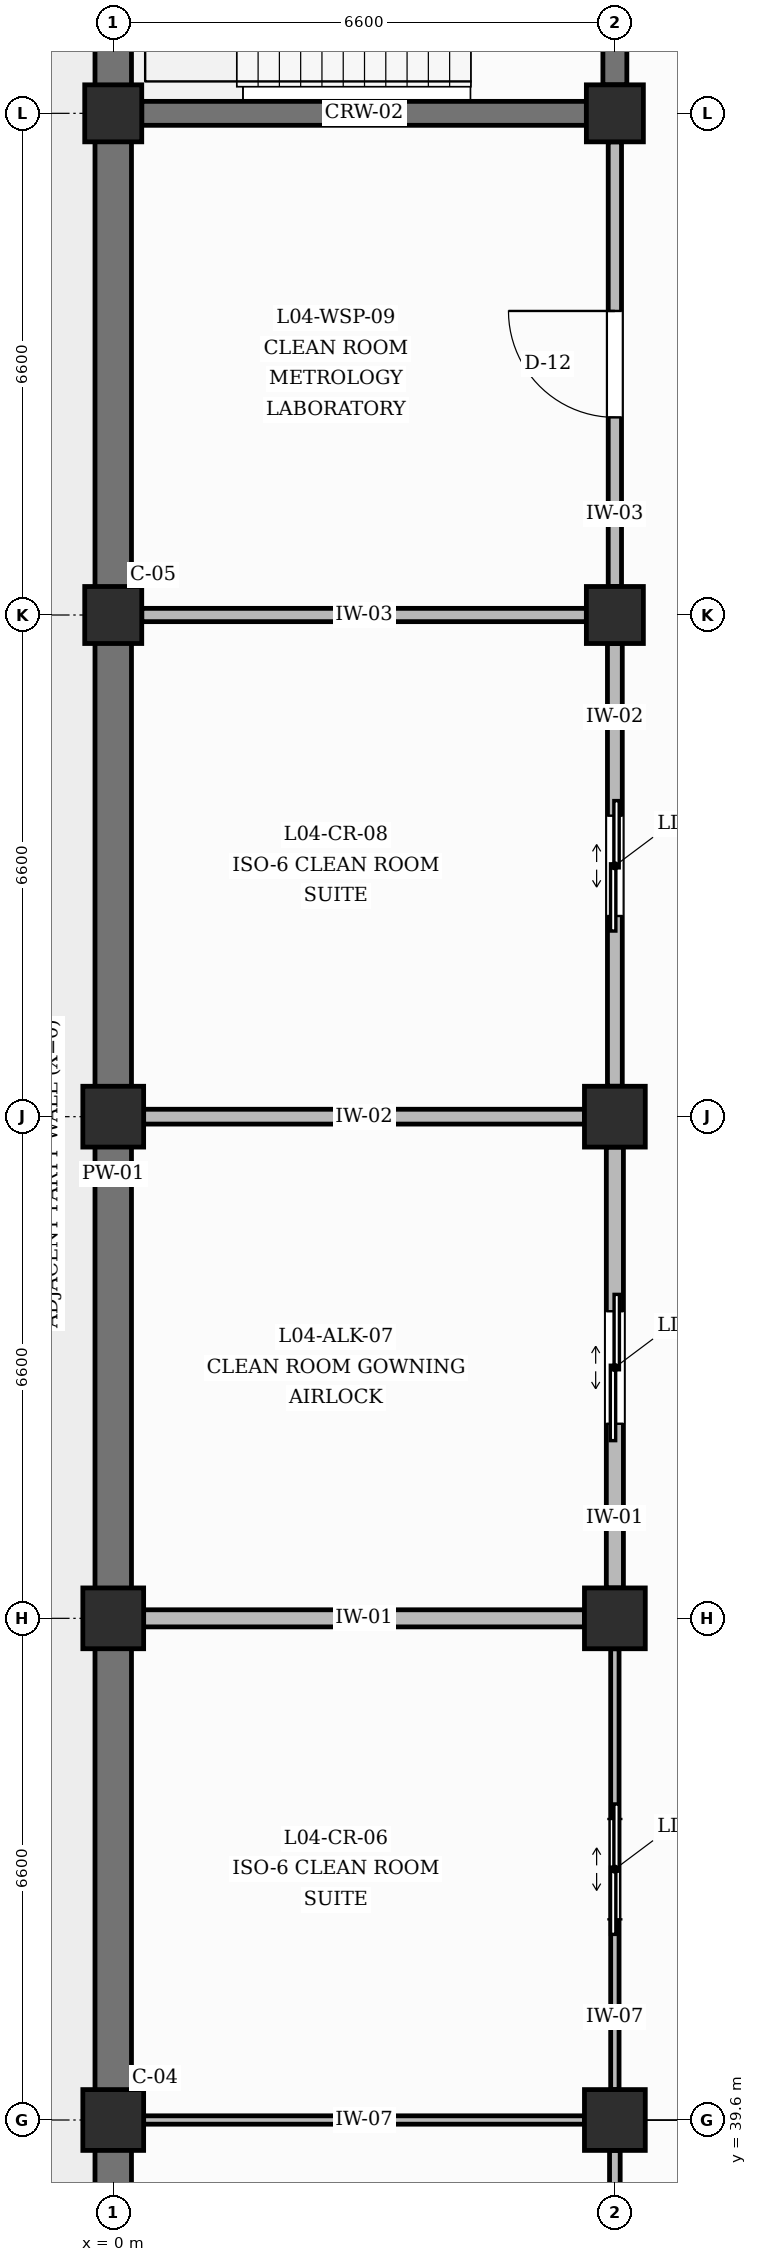
"""IFC4 building model, lengths in metres.
Left out: names, types, materials, properties, quantities, classifications, styles, units other than length and angle.
Written with IfcOpenShell. Run it as: python <this file> out.ifc"""

import sys

from ifc_helpers import new_model, si_unit, direction, frame, frame_2d, origin, origin_2d, place, context, subcontext, project, spatial, rectangle, extrude, element, fill, save


model = new_model("IFC4")
c1 = context("Model", 3, precision=1e-05, world=origin(), true_north=direction((0.0, 1.0)))
c2 = subcontext(c1, "Body", "Model", "MODEL_VIEW")
j1 = project(units=[si_unit("LENGTHUNIT", "METRE"), si_unit("PLANEANGLEUNIT", "RADIAN")], contexts=[c1])
p1 = place(None, origin())
s1 = spatial("IfcSite", under=j1, at=p1, CompositionType="ELEMENT")
p2 = place(p1, origin())
s2 = spatial("IfcBuilding", under=s1, at=p2, CompositionType="ELEMENT")
p3 = place(p2, frame((0.0, 0.0, 18.6)))
s3 = spatial("IfcBuildingStorey", under=s2, at=p3, CompositionType="ELEMENT", Elevation=18.6)
for number, where, z_axis, x_axis in (
    (1, (0.0, 39.6, 0.0), (0.0, 0.0, 1.0), (1.0, 0.0, 0.0)),
    (2, (0.0, 46.2, 0.0), (0.0, 0.0, 1.0), (1.0, 0.0, 0.0)),
    (3, (0.0, 52.8, 0.0), (0.0, 0.0, 1.0), (1.0, 0.0, 0.0)),
):
    element("IfcColumn", number, at=place(p3, frame(where, z_axis=z_axis, x_axis=x_axis)), inside=s3, PredefinedType="COLUMN", context=c2, shape_type="SweptSolid", body=[
        extrude(rectangle(XDim=0.8, YDim=0.8, at=origin_2d()), origin(), (0.0, 0.0, 1.0), 4.2),
    ])
for number, where, z_axis, x_axis in (
    (4, (0.0, 59.4, 0.0), (0.0, 0.0, 1.0), (1.0, 0.0, 0.0)),
    (5, (0.0, 66.0, 0.0), (0.0, 0.0, 1.0), (1.0, 0.0, 0.0)),
):
    element("IfcColumn", number, at=place(p3, frame(where, z_axis=z_axis, x_axis=x_axis)), inside=s3, PredefinedType="COLUMN", context=c2, shape_type="SweptSolid", body=[
        extrude(rectangle(XDim=0.75, YDim=0.75, at=origin_2d()), origin(), (0.0, 0.0, 1.0), 4.2),
    ])
for number, where, z_axis, x_axis in (
    (6, (6.6, 39.6, 0.0), (0.0, 0.0, 1.0), (1.0, 0.0, 0.0)),
    (7, (6.6, 46.2, 0.0), (0.0, 0.0, 1.0), (1.0, 0.0, 0.0)),
    (8, (6.6, 52.8, 0.0), (0.0, 0.0, 1.0), (1.0, 0.0, 0.0)),
):
    element("IfcColumn", number, at=place(p3, frame(where, z_axis=z_axis, x_axis=x_axis)), inside=s3, PredefinedType="COLUMN", context=c2, shape_type="SweptSolid", body=[
        extrude(rectangle(XDim=0.8, YDim=0.8, at=origin_2d()), origin(), (0.0, 0.0, 1.0), 4.2),
    ])
for number, where, z_axis, x_axis in (
    (9, (6.6, 59.4, 0.0), (0.0, 0.0, 1.0), (1.0, 0.0, 0.0)),
    (10, (6.6, 66.0, 0.0), (0.0, 0.0, 1.0), (1.0, 0.0, 0.0)),
):
    element("IfcColumn", number, at=place(p3, frame(where, z_axis=z_axis, x_axis=x_axis)), inside=s3, PredefinedType="COLUMN", context=c2, shape_type="SweptSolid", body=[
        extrude(rectangle(XDim=0.75, YDim=0.75, at=origin_2d()), origin(), (0.0, 0.0, 1.0), 4.2),
    ])
for number, where, z_axis, x_axis in (
    (11, (0.0, 33.4, 0.0), (0.0, 0.0, 1.0), (0.0, 1.0, 0.0)),
    (12, (0.0, 40.0, 0.0), (0.0, 0.0, 1.0), (0.0, 1.0, 0.0)),
):
    element("IfcWall", number, at=place(p3, frame(where, z_axis=z_axis, x_axis=x_axis)), inside=s3, PredefinedType="SOLIDWALL", context=c2, shape_type="SweptSolid", body=[
        extrude(rectangle(XDim=5.8, YDim=0.48, at=frame_2d((2.9, 0.0))), origin(), (0.0, 0.0, 1.0), 3.26),
    ])
p4 = place(p3, frame((0.0, 46.6, 0.0), z_axis=(0.0, 0.0, 1.0), x_axis=(0.0, 1.0, 0.0)))
e13 = element("IfcWall", 13, at=p4, inside=s3, PredefinedType="SOLIDWALL", context=c2, shape_type="SweptSolid", body=[
    extrude(rectangle(XDim=5.8, YDim=0.48, at=frame_2d((2.9, 0.0))), origin(), (0.0, 0.0, 1.0), 3.26),
])
p5 = place(p3, frame((0.0, 53.2, 0.0), z_axis=(0.0, 0.0, 1.0), x_axis=(0.0, 1.0, 0.0)))
e14 = element("IfcWall", 14, at=p5, inside=s3, PredefinedType="SOLIDWALL", context=c2, shape_type="SweptSolid", body=[
    extrude(rectangle(XDim=5.825, YDim=0.48, at=frame_2d((2.913, 0.0))), origin(), (0.0, 0.0, 1.0), 3.26),
])
for number, where, z_axis, x_axis in (
    (15, (0.0, 59.775, 0.0), (0.0, 0.0, 1.0), (0.0, 1.0, 0.0)),
    (16, (0.0, 66.375, 0.0), (0.0, 0.0, 1.0), (0.0, 1.0, 0.0)),
):
    element("IfcWall", number, at=place(p3, frame(where, z_axis=z_axis, x_axis=x_axis)), inside=s3, PredefinedType="SOLIDWALL", context=c2, shape_type="SweptSolid", body=[
        extrude(rectangle(XDim=5.85, YDim=0.48, at=frame_2d((2.925, 0.0))), origin(), (0.0, 0.0, 1.0), 3.26),
    ])
p6 = place(p3, frame((0.375, 66.0, 0.0), z_axis=(0.0, 0.0, 1.0), x_axis=(1.0, 0.0, 0.0)))
e17 = element("IfcWall", 17, at=p6, inside=s3, PredefinedType="SHEAR", context=c2, shape_type="SweptSolid", body=[
    extrude(rectangle(XDim=5.85, YDim=0.315, at=frame_2d((2.925, 0.0))), origin(), (0.0, 0.0, 1.0), 3.16),
])
p7 = place(p3, frame((6.6, 66.375, 0.0), z_axis=(0.0, 0.0, 1.0), x_axis=(0.0, 1.0, 0.0)))
e18 = element("IfcWall", 18, at=p7, inside=s3, PredefinedType="SHEAR", context=c2, shape_type="SweptSolid", body=[
    extrude(rectangle(XDim=5.85, YDim=0.315, at=frame_2d((2.925, 0.0))), origin(), (0.0, 0.0, 1.0), 3.16),
])
p8 = place(p7, frame((2.35, 0.0, 0.0)))
e19 = element("IfcOpeningElement", 19, at=p8, cuts=e18, PredefinedType="OPENING", context=c2, shape_type="SweptSolid", body=[
    extrude(rectangle(XDim=1.15, YDim=2.2, at=frame_2d((0.575, 1.1))), frame((0.0, 0.167, 0.0), z_axis=(0.0, -1.0, 0.0), x_axis=(1.0, 0.0, 0.0)), (0.0, 0.0, 1.0), 0.335),
])
p9 = place(p3, frame((6.6, 33.4, 0.0), z_axis=(0.0, 0.0, 1.0), x_axis=(0.0, 1.0, 0.0)))
e20 = element("IfcWall", 20, at=p9, inside=s3, PredefinedType="PARTITIONING", context=c2, shape_type="SweptSolid", body=[
    extrude(rectangle(XDim=5.8, YDim=0.14, at=frame_2d((2.9, 0.0))), origin(), (0.0, 0.0, 1.0), 3.16),
])
p10 = place(p9, frame((2.16, 0.0, 0.0)))
e21 = element("IfcOpeningElement", 21, at=p10, cuts=e20, PredefinedType="OPENING", context=c2, shape_type="SweptSolid", body=[
    extrude(rectangle(XDim=1.48, YDim=2.25, at=frame_2d((0.74, 1.125))), frame((0.0, 0.08, 0.0), z_axis=(0.0, -1.0, 0.0), x_axis=(1.0, 0.0, 0.0)), (0.0, 0.0, 1.0), 0.16),
])
p11 = place(p3, frame((0.4, 39.6, 0.0), z_axis=(0.0, 0.0, 1.0), x_axis=(1.0, 0.0, 0.0)))
e22 = element("IfcWall", 22, at=p11, inside=s3, PredefinedType="PARTITIONING", context=c2, shape_type="SweptSolid", body=[
    extrude(rectangle(XDim=5.8, YDim=0.11, at=frame_2d((2.9, 0.0))), origin(), (0.0, 0.0, 1.0), 3.16),
])
p12 = place(p3, frame((6.6, 40.0, 0.0), z_axis=(0.0, 0.0, 1.0), x_axis=(0.0, 1.0, 0.0)))
e23 = element("IfcWall", 23, at=p12, inside=s3, PredefinedType="PARTITIONING", context=c2, shape_type="SweptSolid", body=[
    extrude(rectangle(XDim=5.8, YDim=0.11, at=frame_2d((2.9, 0.0))), origin(), (0.0, 0.0, 1.0), 3.16),
])
p13 = place(p12, frame((2.24, 0.0, 0.0)))
e24 = element("IfcOpeningElement", 24, at=p13, cuts=e23, PredefinedType="OPENING", context=c2, shape_type="SweptSolid", body=[
    extrude(rectangle(XDim=1.32, YDim=2.2, at=frame_2d((0.66, 1.1))), frame((0.0, 0.065, 0.0), z_axis=(0.0, -1.0, 0.0), x_axis=(1.0, 0.0, 0.0)), (0.0, 0.0, 1.0), 0.13),
])
p14 = place(p3, frame((0.4, 46.2, 0.0), z_axis=(0.0, 0.0, 1.0), x_axis=(1.0, 0.0, 0.0)))
e25 = element("IfcWall", 25, at=p14, inside=s3, PredefinedType="PARTITIONING", context=c2, shape_type="SweptSolid", body=[
    extrude(rectangle(XDim=5.8, YDim=0.225, at=frame_2d((2.9, 0.0))), origin(), (0.0, 0.0, 1.0), 3.16),
])
p15 = place(p3, frame((6.6, 46.6, 0.0), z_axis=(0.0, 0.0, 1.0), x_axis=(0.0, 1.0, 0.0)))
e26 = element("IfcWall", 26, at=p15, inside=s3, PredefinedType="PARTITIONING", context=c2, shape_type="SweptSolid", body=[
    extrude(rectangle(XDim=5.8, YDim=0.225, at=frame_2d((2.9, 0.0))), origin(), (0.0, 0.0, 1.0), 3.16),
])
p16 = place(p15, frame((2.16, 0.0, 0.0)))
e27 = element("IfcOpeningElement", 27, at=p16, cuts=e26, PredefinedType="OPENING", context=c2, shape_type="SweptSolid", body=[
    extrude(rectangle(XDim=1.48, YDim=2.25, at=frame_2d((0.74, 1.125))), frame((0.0, 0.123, 0.0), z_axis=(0.0, -1.0, 0.0), x_axis=(1.0, 0.0, 0.0)), (0.0, 0.0, 1.0), 0.245),
])
p17 = place(p3, frame((0.4, 52.8, 0.0), z_axis=(0.0, 0.0, 1.0), x_axis=(1.0, 0.0, 0.0)))
e28 = element("IfcWall", 28, at=p17, inside=s3, PredefinedType="PARTITIONING", context=c2, shape_type="SweptSolid", body=[
    extrude(rectangle(XDim=5.8, YDim=0.195, at=frame_2d((2.9, 0.0))), origin(), (0.0, 0.0, 1.0), 3.16),
])
p18 = place(p3, frame((6.6, 53.2, 0.0), z_axis=(0.0, 0.0, 1.0), x_axis=(0.0, 1.0, 0.0)))
e29 = element("IfcWall", 29, at=p18, inside=s3, PredefinedType="PARTITIONING", context=c2, shape_type="SweptSolid", body=[
    extrude(rectangle(XDim=5.825, YDim=0.195, at=frame_2d((2.913, 0.0))), origin(), (0.0, 0.0, 1.0), 3.16),
])
p19 = place(p18, frame((2.24, 0.0, 0.0)))
e30 = element("IfcOpeningElement", 30, at=p19, cuts=e29, PredefinedType="OPENING", context=c2, shape_type="SweptSolid", body=[
    extrude(rectangle(XDim=1.32, YDim=2.2, at=frame_2d((0.66, 1.1))), frame((0.0, 0.107, 0.0), z_axis=(0.0, -1.0, 0.0), x_axis=(1.0, 0.0, 0.0)), (0.0, 0.0, 1.0), 0.215),
])
p20 = place(p3, frame((0.375, 59.4, 0.0), z_axis=(0.0, 0.0, 1.0), x_axis=(1.0, 0.0, 0.0)))
e31 = element("IfcWall", 31, at=p20, inside=s3, PredefinedType="PARTITIONING", context=c2, shape_type="SweptSolid", body=[
    extrude(rectangle(XDim=5.85, YDim=0.175, at=frame_2d((2.925, 0.0))), origin(), (0.0, 0.0, 1.0), 3.16),
])
p21 = place(p3, frame((6.6, 59.775, 0.0), z_axis=(0.0, 0.0, 1.0), x_axis=(0.0, 1.0, 0.0)))
e32 = element("IfcWall", 32, at=p21, inside=s3, PredefinedType="PARTITIONING", context=c2, shape_type="SweptSolid", body=[
    extrude(rectangle(XDim=5.85, YDim=0.175, at=frame_2d((2.925, 0.0))), origin(), (0.0, 0.0, 1.0), 3.16),
])
p22 = place(p21, frame((2.225, 0.0, 0.0)))
e33 = element("IfcOpeningElement", 33, at=p22, cuts=e32, PredefinedType="OPENING", context=c2, shape_type="SweptSolid", body=[
    extrude(rectangle(XDim=1.4, YDim=2.25, at=frame_2d((0.7, 1.125))), frame((0.0, 0.097, 0.0), z_axis=(0.0, -1.0, 0.0), x_axis=(1.0, 0.0, 0.0)), (0.0, 0.0, 1.0), 0.195),
])
p23 = place(p13, origin())
e34 = element("IfcDoor", 34, at=p23, inside=s3, OperationType="DOUBLE_DOOR_SLIDING", PredefinedType="USERDEFINED", context=c2, shape_type="SweptSolid", body=[
    extrude(rectangle(XDim=1.32, YDim=2.2, at=frame_2d((0.66, 1.1))), frame((0.0, 0.025, 0.0), z_axis=(0.0, -1.0, 0.0), x_axis=(1.0, 0.0, 0.0)), (0.0, 0.0, 1.0), 0.05),
])
fill(e24, e34)
p24 = place(p16, origin())
e35 = element("IfcDoor", 35, at=p24, inside=s3, OperationType="DOUBLE_DOOR_SLIDING", PredefinedType="USERDEFINED", context=c2, shape_type="SweptSolid", body=[
    extrude(rectangle(XDim=1.48, YDim=2.25, at=frame_2d((0.74, 1.125))), frame((0.0, 0.025, 0.0), z_axis=(0.0, -1.0, 0.0), x_axis=(1.0, 0.0, 0.0)), (0.0, 0.0, 1.0), 0.05),
])
fill(e27, e35)
p25 = place(p19, origin())
e36 = element("IfcDoor", 36, at=p25, inside=s3, OperationType="DOUBLE_DOOR_SLIDING", PredefinedType="USERDEFINED", context=c2, shape_type="SweptSolid", body=[
    extrude(rectangle(XDim=1.32, YDim=2.2, at=frame_2d((0.66, 1.1))), frame((0.0, 0.025, 0.0), z_axis=(0.0, -1.0, 0.0), x_axis=(1.0, 0.0, 0.0)), (0.0, 0.0, 1.0), 0.05),
])
fill(e30, e36)
p26 = place(p22, origin())
e37 = element("IfcDoor", 37, at=p26, inside=s3, OperationType="SINGLE_SWING_RIGHT", PredefinedType="DOOR", context=c2, shape_type="SweptSolid", body=[
    extrude(rectangle(XDim=1.4, YDim=2.25, at=frame_2d((0.7, 1.125))), frame((0.0, 0.025, 0.0), z_axis=(0.0, -1.0, 0.0), x_axis=(1.0, 0.0, 0.0)), (0.0, 0.0, 1.0), 0.05),
])
fill(e33, e37)
save(model, sys.argv[1])
